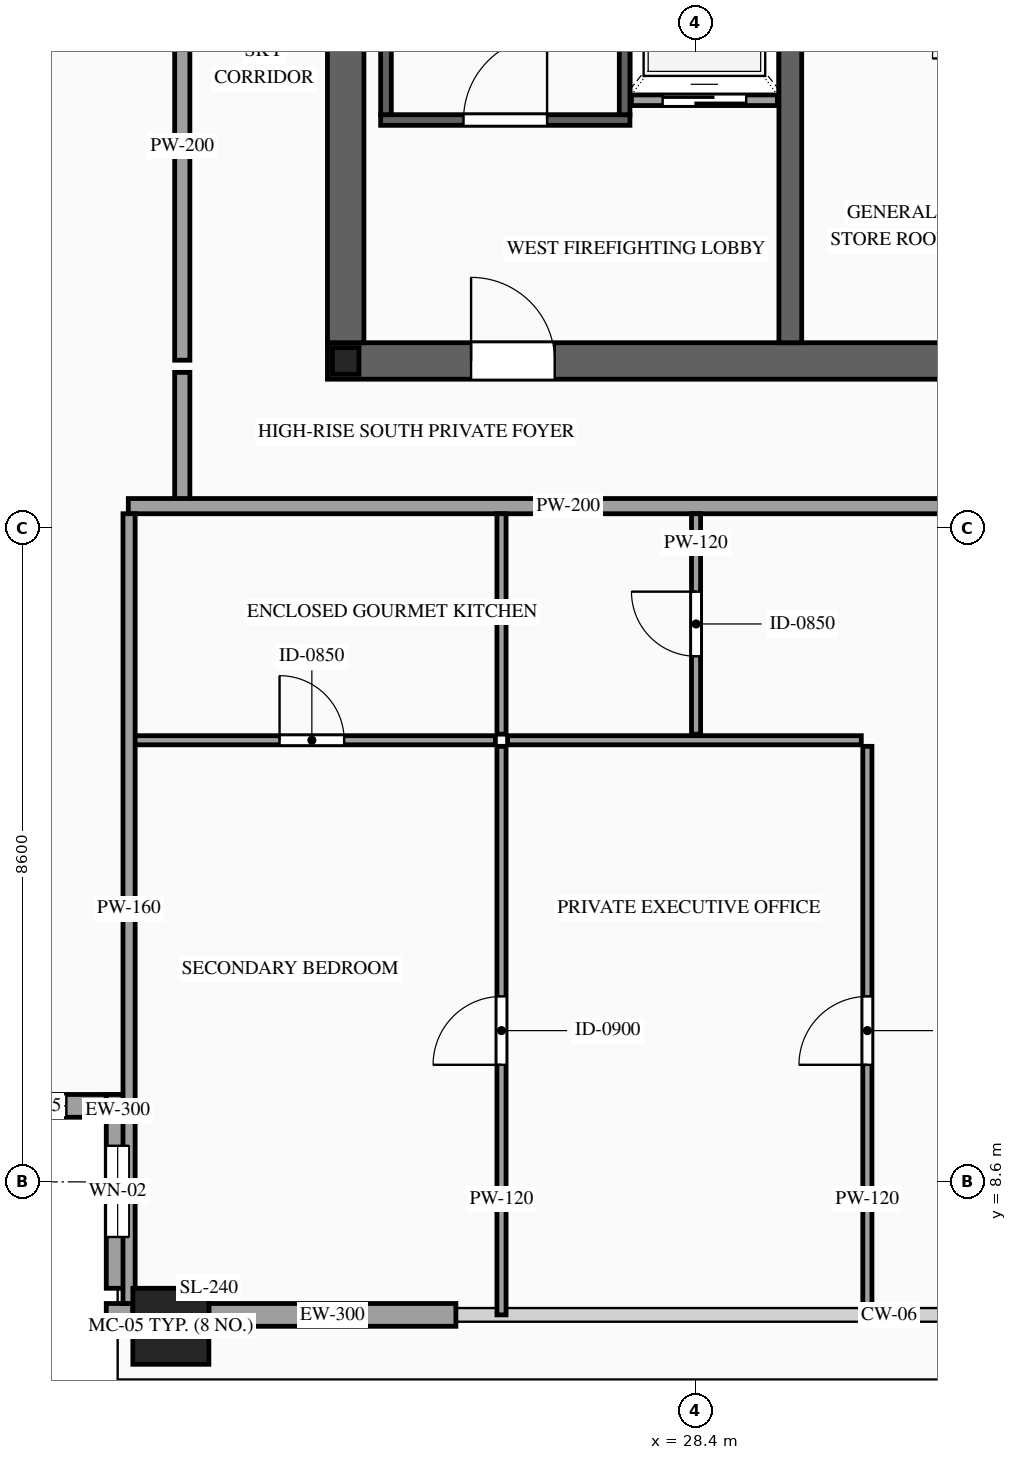
"""IFC4 building model, lengths in metres.
Left out: names, types, materials, properties, quantities, classifications, styles, units other than length and angle.
Written with IfcOpenShell. Run it as: python <this file> out.ifc"""

import sys

from ifc_helpers import new_model, si_unit, direction, frame, frame_2d, origin, origin_2d, place, context, subcontext, project, spatial, rectangle, hollow_rectangle, i_section, extrude, source, transform, mapped, element, fill, save


model = new_model("IFC4")
c1 = context("Model", 3, precision=1e-05, world=origin(), true_north=direction((0.0, 1.0)))
c2 = subcontext(c1, "Body", "Model", "MODEL_VIEW")
j1 = project(units=[si_unit("LENGTHUNIT", "METRE"), si_unit("PLANEANGLEUNIT", "RADIAN")], contexts=[c1])
p1 = place(None, origin())
s1 = spatial("IfcSite", under=j1, at=p1, CompositionType="ELEMENT")
p2 = place(p1, origin())
s2 = spatial("IfcBuilding", under=s1, at=p2, CompositionType="ELEMENT")
p3 = place(p2, frame((0.0, 0.0, 347.2)))
s3 = spatial("IfcBuildingStorey", under=s2, at=p3, CompositionType="ELEMENT", Elevation=347.2)
p4 = place(p3, frame((23.56, 19.4, 0.0), z_axis=(0.0, 0.0, 1.0), x_axis=(1.0, 0.0, 0.0)))
e1 = element("IfcWall", 1, at=p4, inside=s3, PredefinedType="SHEAR", context=c2, shape_type="SweptSolid", body=[
    extrude(rectangle(XDim=26.88, YDim=0.48, at=frame_2d((13.44, 0.0))), origin(), (0.0, 0.0, 1.0), 4.0),
])
p5 = place(p4, frame((1.89, 0.0, 0.0)))
e2 = element("IfcOpeningElement", 2, at=p5, cuts=e1, PredefinedType="OPENING", context=c2, shape_type="SweptSolid", body=[
    extrude(rectangle(XDim=1.1, YDim=2.2, at=frame_2d((0.55, 1.1))), frame((0.0, 0.255, 0.0), z_axis=(0.0, -1.0, 0.0), x_axis=(1.0, 0.0, 0.0)), (0.0, 0.0, 1.0), 0.51),
])
p6 = place(p4, frame((9.79, 0.0, 0.0)))
e3 = element("IfcOpeningElement", 3, at=p6, cuts=e1, PredefinedType="OPENING", context=c2, shape_type="SweptSolid", body=[
    extrude(rectangle(XDim=1.1, YDim=2.2, at=frame_2d((0.55, 1.1))), frame((0.0, 0.255, 0.0), z_axis=(0.0, -1.0, 0.0), x_axis=(1.0, 0.0, 0.0)), (0.0, 0.0, 1.0), 0.51),
])
p7 = place(p4, frame((22.99, 0.0, 0.0)))
e4 = element("IfcOpeningElement", 4, at=p7, cuts=e1, PredefinedType="OPENING", context=c2, shape_type="SweptSolid", body=[
    extrude(rectangle(XDim=1.1, YDim=2.2, at=frame_2d((0.55, 1.1))), frame((0.0, 0.255, 0.0), z_axis=(0.0, -1.0, 0.0), x_axis=(1.0, 0.0, 0.0)), (0.0, 0.0, 1.0), 0.51),
])
p8 = place(p4, frame((19.61, 0.0, 0.0)))
e5 = element("IfcOpeningElement", 5, at=p8, cuts=e1, PredefinedType="OPENING", context=c2, shape_type="SweptSolid", body=[
    extrude(rectangle(XDim=0.9, YDim=2.15, at=frame_2d((0.45, 1.075))), frame((0.0, 0.255, 0.0), z_axis=(0.0, -1.0, 0.0), x_axis=(1.0, 0.0, 0.0)), (0.0, 0.0, 1.0), 0.51),
])
p9 = place(p4, frame((18.17, 0.0, 0.0)))
e6 = element("IfcOpeningElement", 6, at=p9, cuts=e1, PredefinedType="OPENING", context=c2, shape_type="SweptSolid", body=[
    extrude(rectangle(XDim=0.9, YDim=2.15, at=frame_2d((0.45, 1.075))), frame((0.0, 0.255, 0.0), z_axis=(0.0, -1.0, 0.0), x_axis=(1.0, 0.0, 0.0)), (0.0, 0.0, 1.0), 0.51),
])
m1 = source(origin(), c2, "Body", "SweptSolid", [
    extrude(rectangle(XDim=12.32, YDim=0.48, at=frame_2d((6.16, 0.0))), origin(), (0.0, 0.0, 1.0), 4.0),
])
p10 = place(p3, frame((23.8, 19.64, 0.0), z_axis=(0.0, 0.0, 1.0), x_axis=(0.0, 1.0, 0.0)))
e7 = element("IfcWall", 7, at=p10, inside=s3, PredefinedType="SHEAR", context=c2, shape_type="MappedRepresentation", body=[
    mapped(m1, transform((0.0, 0.0, 0.0), scale=1.0)),
])
m2 = source(origin(), c2, "Body", "SweptSolid", [
    extrude(rectangle(XDim=12.32, YDim=0.3, at=frame_2d((6.16, 0.0))), origin(), (0.0, 0.0, 1.0), 4.0),
])
p11 = place(p3, frame((29.65, 19.64, 0.0), z_axis=(0.0, 0.0, 1.0), x_axis=(0.0, 1.0, 0.0)))
e8 = element("IfcWall", 8, at=p11, inside=s3, PredefinedType="SOLIDWALL", context=c2, shape_type="MappedRepresentation", body=[
    mapped(m2, transform((0.0, 0.0, 0.0), scale=1.0)),
])
m3 = source(origin(), c2, "Body", "SweptSolid", [
    extrude(i_section(OverallWidth=0.35, OverallDepth=0.35, WebThickness=0.012, FlangeThickness=0.019, at=origin_2d()), origin(), (0.0, 0.0, 1.0), 4.0),
])
p12 = place(p3, frame((23.8, 19.4, 0.0), z_axis=(0.0, 0.0, 1.0), x_axis=(1.0, 0.0, 0.0)))
e9 = element("IfcColumn", 9, at=p12, inside=s3, PredefinedType="COLUMN", context=c2, shape_type="MappedRepresentation", body=[
    mapped(m3, transform((0.0, 0.0, 0.0), scale=1.0)),
])
m4 = source(origin(), c2, "Body", "SweptSolid", [
    extrude(hollow_rectangle(XDim=1.0, YDim=1.0, WallThickness=0.048, at=origin_2d()), origin(), (0.0, 0.0, 1.0), 4.0),
])
p13 = place(p3, frame((21.5, 6.7, 0.0), z_axis=(0.0, 0.0, 1.0), x_axis=(1.0, 0.0, 0.0)))
e10 = element("IfcColumn", 10, at=p13, inside=s3, PredefinedType="COLUMN", context=c2, shape_type="MappedRepresentation", body=[
    mapped(m4, transform((0.0, 0.0, 0.0), scale=1.0)),
])
p14 = place(p3, frame((18.4, 9.6, 0.0), z_axis=(0.0, 0.0, 1.0), x_axis=(1.0, 0.0, 0.0)))
e11 = element("IfcWall", 11, at=p14, inside=s3, PredefinedType="SOLIDWALL", context=c2, shape_type="SweptSolid", body=[
    extrude(rectangle(XDim=2.55, YDim=0.3, at=frame_2d((1.275, 0.0))), origin(), (0.0, 0.0, 1.0), 3.7),
])
p15 = place(p14, frame((0.825, 0.0, 0.85)))
e12 = element("IfcOpeningElement", 12, at=p15, cuts=e11, PredefinedType="OPENING", context=c2, shape_type="SweptSolid", body=[
    extrude(rectangle(XDim=0.9, YDim=1.5, at=frame_2d((0.45, 0.75))), frame((0.0, 0.165, 0.0), z_axis=(0.0, -1.0, 0.0), x_axis=(1.0, 0.0, 0.0)), (0.0, 0.0, 1.0), 0.33),
])
p16 = place(p3, frame((20.8, 9.75, 0.0), z_axis=(0.0, 0.0, 1.0), x_axis=(0.0, -1.0, 0.0)))
e13 = element("IfcWall", 13, at=p16, inside=s3, PredefinedType="SOLIDWALL", context=c2, shape_type="SweptSolid", body=[
    extrude(rectangle(XDim=2.55, YDim=0.3, at=frame_2d((1.275, 0.0))), origin(), (0.0, 0.0, 1.0), 3.7),
])
p17 = place(p16, frame((0.675, 0.0, 0.85)))
e14 = element("IfcOpeningElement", 14, at=p17, cuts=e13, PredefinedType="OPENING", context=c2, shape_type="SweptSolid", body=[
    extrude(rectangle(XDim=1.2, YDim=2.1, at=frame_2d((0.6, 1.05))), frame((0.0, 0.165, 0.0), z_axis=(0.0, -1.0, 0.0), x_axis=(1.0, 0.0, 0.0)), (0.0, 0.0, 1.0), 0.33),
])
m5 = source(origin(), c2, "Body", "SweptSolid", [
    extrude(rectangle(XDim=0.35, YDim=0.3, at=frame_2d((0.175, 0.0))), origin(), (0.0, 0.0, 1.0), 3.7),
])
p18 = place(p3, frame((20.65, 6.85, 0.0), z_axis=(0.0, 0.0, 1.0), x_axis=(1.0, 0.0, 0.0)))
e15 = element("IfcWall", 15, at=p18, inside=s3, PredefinedType="SOLIDWALL", context=c2, shape_type="MappedRepresentation", body=[
    mapped(m5, transform((0.0, 0.0, 0.0), scale=1.0)),
])
m6 = source(origin(), c2, "Body", "SweptSolid", [
    extrude(rectangle(XDim=3.25, YDim=0.3, at=frame_2d((1.625, 0.0))), origin(), (0.0, 0.0, 1.0), 3.305),
])
p19 = place(p3, frame((22.0, 6.85, 0.0), z_axis=(0.0, 0.0, 1.0), x_axis=(1.0, 0.0, 0.0)))
e16 = element("IfcWall", 16, at=p19, inside=s3, PredefinedType="SOLIDWALL", context=c2, shape_type="MappedRepresentation", body=[
    mapped(m6, transform((0.0, 0.0, 0.0), scale=1.0)),
])
p20 = place(p3, frame((27.56, 22.83, 0.0), z_axis=(0.0, 0.0, 1.0), x_axis=(1.0, 0.0, 0.0)))
e17 = element("IfcWall", 17, at=p20, inside=s3, PredefinedType="SOLIDWALL", context=c2, shape_type="SweptSolid", body=[
    extrude(rectangle(XDim=1.92, YDim=0.14, at=frame_2d((0.96, 0.0))), origin(), (0.0, 0.0, 1.0), 3.7),
])
p21 = place(p20, frame((0.41, 0.0, 0.0)))
e18 = element("IfcOpeningElement", 18, at=p21, cuts=e17, PredefinedType="OPENING", context=c2, shape_type="SweptSolid", body=[
    extrude(rectangle(XDim=1.1, YDim=2.2, at=frame_2d((0.55, 1.1))), frame((0.0, 0.085, 0.0), z_axis=(0.0, -1.0, 0.0), x_axis=(1.0, 0.0, 0.0)), (0.0, 0.0, 1.0), 0.17),
])
p22 = place(p3, frame((24.26, 22.57, 0.0), z_axis=(0.0, 0.0, 1.0), x_axis=(1.0, 0.0, 0.0)))
e19 = element("IfcWall", 19, at=p22, inside=s3, PredefinedType="SOLIDWALL", context=c2, shape_type="SweptSolid", body=[
    extrude(rectangle(XDim=3.28, YDim=0.14, at=frame_2d((1.64, 0.0))), origin(), (0.0, 0.0, 1.0), 3.7),
])
p23 = place(p22, frame((1.09, 0.0, 0.0)))
e20 = element("IfcOpeningElement", 20, at=p23, cuts=e19, PredefinedType="OPENING", context=c2, shape_type="SweptSolid", body=[
    extrude(rectangle(XDim=1.1, YDim=2.2, at=frame_2d((0.55, 1.1))), frame((0.0, 0.085, 0.0), z_axis=(0.0, -1.0, 0.0), x_axis=(1.0, 0.0, 0.0)), (0.0, 0.0, 1.0), 0.17),
])
m7 = source(origin(), c2, "Body", "SweptSolid", [
    extrude(rectangle(XDim=8.94, YDim=0.14, at=frame_2d((4.47, 0.0))), origin(), (0.0, 0.0, 1.0), 3.7),
])
for number, where, z_axis, x_axis in (
    (21, (24.33, 22.64, 0.0), (0.0, 0.0, 1.0), (0.0, 1.0, 0.0)),
    (22, (27.47, 22.64, 0.0), (0.0, 0.0, 1.0), (0.0, 1.0, 0.0)),
):
    element("IfcWall", number, at=place(p3, frame(where, z_axis=z_axis, x_axis=x_axis)), inside=s3, PredefinedType="SOLIDWALL", context=c2, shape_type="MappedRepresentation", body=[
        mapped(m7, transform((0.0, 0.0, 0.0), scale=1.0)),
    ])
m8 = source(origin(), c2, "Body", "SweptSolid", [
    extrude(rectangle(XDim=1.7, YDim=0.2, at=frame_2d((0.85, 0.0))), origin(), (0.0, 0.0, 1.0), 3.7),
])
p24 = place(p3, frame((21.65, 17.55, 0.0), z_axis=(0.0, 0.0, 1.0), x_axis=(0.0, 1.0, 0.0)))
e23 = element("IfcWall", 23, at=p24, inside=s3, PredefinedType="PARTITIONING", context=c2, shape_type="MappedRepresentation", body=[
    mapped(m8, transform((0.0, 0.0, 0.0), scale=1.0)),
])
p25 = place(p3, frame((20.94, 17.49, 0.0), z_axis=(0.0, 0.0, 1.0), x_axis=(1.0, 0.0, 0.0)))
e24 = element("IfcWall", 24, at=p25, inside=s3, PredefinedType="PARTITIONING", context=c2, shape_type="SweptSolid", body=[
    extrude(rectangle(XDim=19.834, YDim=0.2, at=frame_2d((9.917, 0.0))), origin(), (0.0, 0.0, 1.0), 3.7),
])
p26 = place(p25, frame((11.824, 0.0, 0.0)))
e25 = element("IfcOpeningElement", 25, at=p26, cuts=e24, PredefinedType="OPENING", context=c2, shape_type="SweptSolid", body=[
    extrude(rectangle(XDim=1.0, YDim=2.2, at=frame_2d((0.5, 1.1))), frame((0.0, 0.115, 0.0), z_axis=(0.0, -1.0, 0.0), x_axis=(1.0, 0.0, 0.0)), (0.0, 0.0, 1.0), 0.23),
])
p27 = place(p3, frame((20.94, 14.41, 0.0), z_axis=(0.0, 0.0, 1.0), x_axis=(1.0, 0.0, 0.0)))
e26 = element("IfcWall", 26, at=p27, inside=s3, PredefinedType="PARTITIONING", context=c2, shape_type="SweptSolid", body=[
    extrude(rectangle(XDim=4.83, YDim=0.12, at=frame_2d((2.415, 0.0))), origin(), (0.0, 0.0, 1.0), 3.7),
])
p28 = place(p27, frame((1.99, 0.0, 0.0)))
e27 = element("IfcOpeningElement", 27, at=p28, cuts=e26, PredefinedType="OPENING", context=c2, shape_type="SweptSolid", body=[
    extrude(rectangle(XDim=0.85, YDim=2.1, at=frame_2d((0.425, 1.05))), frame((0.0, 0.075, 0.0), z_axis=(0.0, -1.0, 0.0), x_axis=(1.0, 0.0, 0.0)), (0.0, 0.0, 1.0), 0.15),
])
m9 = source(origin(), c2, "Body", "SweptSolid", [
    extrude(rectangle(XDim=2.9, YDim=0.12, at=frame_2d((1.45, 0.0))), origin(), (0.0, 0.0, 1.0), 3.7),
])
p29 = place(p3, frame((25.85, 14.49, 0.0), z_axis=(0.0, 0.0, 1.0), x_axis=(0.0, 1.0, 0.0)))
e28 = element("IfcWall", 28, at=p29, inside=s3, PredefinedType="PARTITIONING", context=c2, shape_type="MappedRepresentation", body=[
    mapped(m9, transform((0.0, 0.0, 0.0), scale=1.0)),
])
p30 = place(p3, frame((28.41, 14.49, 0.0), z_axis=(0.0, 0.0, 1.0), x_axis=(0.0, 1.0, 0.0)))
e29 = element("IfcWall", 29, at=p30, inside=s3, PredefinedType="PARTITIONING", context=c2, shape_type="SweptSolid", body=[
    extrude(rectangle(XDim=2.9, YDim=0.12, at=frame_2d((1.45, 0.0))), origin(), (0.0, 0.0, 1.0), 3.7),
])
p31 = place(p30, frame((1.025, 0.0, 0.0)))
e30 = element("IfcOpeningElement", 30, at=p31, cuts=e29, PredefinedType="OPENING", context=c2, shape_type="SweptSolid", body=[
    extrude(rectangle(XDim=0.85, YDim=2.1, at=frame_2d((0.425, 1.05))), frame((0.0, 0.075, 0.0), z_axis=(0.0, -1.0, 0.0), x_axis=(1.0, 0.0, 0.0)), (0.0, 0.0, 1.0), 0.15),
])
p32 = place(p3, frame((25.85, 6.85, 0.0), z_axis=(0.0, 0.0, 1.0), x_axis=(0.0, 1.0, 0.0)))
e31 = element("IfcWall", 31, at=p32, inside=s3, PredefinedType="PARTITIONING", context=c2, shape_type="SweptSolid", body=[
    extrude(rectangle(XDim=7.48, YDim=0.12, at=frame_2d((3.74, 0.0))), origin(), (0.0, 0.0, 1.0), 3.7),
])
p33 = place(p32, frame((3.29, 0.0, 0.0)))
e32 = element("IfcOpeningElement", 32, at=p33, cuts=e31, PredefinedType="OPENING", context=c2, shape_type="SweptSolid", body=[
    extrude(rectangle(XDim=0.9, YDim=2.15, at=frame_2d((0.45, 1.075))), frame((0.0, 0.075, 0.0), z_axis=(0.0, -1.0, 0.0), x_axis=(1.0, 0.0, 0.0)), (0.0, 0.0, 1.0), 0.15),
])
m10 = source(origin(), c2, "Body", "SweptSolid", [
    extrude(rectangle(XDim=4.654, YDim=0.12, at=frame_2d((2.327, 0.0))), origin(), (0.0, 0.0, 1.0), 3.7),
])
p34 = place(p3, frame((25.93, 14.41, 0.0), z_axis=(0.0, 0.0, 1.0), x_axis=(1.0, 0.0, 0.0)))
e33 = element("IfcWall", 33, at=p34, inside=s3, PredefinedType="PARTITIONING", context=c2, shape_type="MappedRepresentation", body=[
    mapped(m10, transform((0.0, 0.0, 0.0), scale=1.0)),
])
p35 = place(p3, frame((30.664, 6.85, 0.0), z_axis=(0.0, 0.0, 1.0), x_axis=(0.0, 1.0, 0.0)))
e34 = element("IfcWall", 34, at=p35, inside=s3, PredefinedType="PARTITIONING", context=c2, shape_type="SweptSolid", body=[
    extrude(rectangle(XDim=7.48, YDim=0.12, at=frame_2d((3.74, 0.0))), origin(), (0.0, 0.0, 1.0), 3.7),
])
p36 = place(p35, frame((3.29, 0.0, 0.0)))
e35 = element("IfcOpeningElement", 35, at=p36, cuts=e34, PredefinedType="OPENING", context=c2, shape_type="SweptSolid", body=[
    extrude(rectangle(XDim=0.9, YDim=2.15, at=frame_2d((0.45, 1.075))), frame((0.0, 0.075, 0.0), z_axis=(0.0, -1.0, 0.0), x_axis=(1.0, 0.0, 0.0)), (0.0, 0.0, 1.0), 0.15),
])
m11 = source(origin(), c2, "Body", "SweptSolid", [
    extrude(rectangle(XDim=10.39, YDim=0.16, at=frame_2d((5.195, 0.0))), origin(), (0.0, 0.0, 1.0), 3.7),
])
p37 = place(p3, frame((20.95, 7.0, 0.0), z_axis=(0.0, 0.0, 1.0), x_axis=(0.0, 1.0, 0.0)))
e36 = element("IfcWall", 36, at=p37, inside=s3, PredefinedType="PARTITIONING", context=c2, shape_type="MappedRepresentation", body=[
    mapped(m11, transform((0.0, 0.0, 0.0), scale=1.0)),
])
p38 = place(p3, frame((21.65, 19.41, 0.0), z_axis=(0.0, 0.0, 1.0), x_axis=(0.0, 1.0, 0.0)))
e37 = element("IfcWall", 37, at=p38, inside=s3, PredefinedType="PARTITIONING", context=c2, shape_type="SweptSolid", body=[
    extrude(rectangle(XDim=12.78, YDim=0.2, at=frame_2d((6.39, 0.0))), origin(), (0.0, 0.0, 1.0), 3.7),
])
p39 = place(p38, frame((5.89, 0.0, 0.0)))
e38 = element("IfcOpeningElement", 38, at=p39, cuts=e37, PredefinedType="OPENING", context=c2, shape_type="SweptSolid", body=[
    extrude(rectangle(XDim=1.0, YDim=2.2, at=frame_2d((0.5, 1.1))), frame((0.0, 0.115, 0.0), z_axis=(0.0, -1.0, 0.0), x_axis=(1.0, 0.0, 0.0)), (0.0, 0.0, 1.0), 0.23),
])
m12 = source(origin(), c2, "Body", "SweptSolid", [
    extrude(rectangle(XDim=0.9, YDim=1.5, at=frame_2d((0.45, 0.75))), frame((0.0, 0.03, 0.0), z_axis=(0.0, -1.0, 0.0), x_axis=(1.0, 0.0, 0.0)), (0.0, 0.0, 1.0), 0.06),
])
p40 = place(p15, origin())
e39 = element("IfcWindow", 39, at=p40, inside=s3, PartitioningType="SINGLE_PANEL", PredefinedType="WINDOW", context=c2, shape_type="MappedRepresentation", body=[
    mapped(m12, transform((0.0, 0.0, 0.0), scale=1.0)),
])
fill(e12, e39)
m13 = source(origin(), c2, "Body", "SweptSolid", [
    extrude(rectangle(XDim=1.2, YDim=2.1, at=frame_2d((0.6, 1.05))), frame((0.0, 0.03, 0.0), z_axis=(0.0, -1.0, 0.0), x_axis=(1.0, 0.0, 0.0)), (0.0, 0.0, 1.0), 0.06),
])
p41 = place(p17, origin())
e40 = element("IfcWindow", 40, at=p41, inside=s3, PartitioningType="SINGLE_PANEL", PredefinedType="WINDOW", context=c2, shape_type="MappedRepresentation", body=[
    mapped(m13, transform((0.0, 0.0, 0.0), scale=1.0)),
])
fill(e14, e40)
m14 = source(origin(), c2, "Body", "SweptSolid", [
    extrude(rectangle(XDim=1.1, YDim=2.2, at=frame_2d((0.55, 1.1))), frame((0.0, 0.025, 0.0), z_axis=(0.0, -1.0, 0.0), x_axis=(1.0, 0.0, 0.0)), (0.0, 0.0, 1.0), 0.05),
])
p42 = place(p21, origin())
e41 = element("IfcDoor", 41, at=p42, inside=s3, OperationType="SLIDING_TO_LEFT", PredefinedType="DOOR", context=c2, shape_type="MappedRepresentation", body=[
    mapped(m14, transform((0.0, 0.0, 0.0), scale=1.0)),
])
fill(e18, e41)
m15 = source(origin(), c2, "Body", "SweptSolid", [
    extrude(rectangle(XDim=1.1, YDim=2.2, at=frame_2d((0.55, 1.1))), frame((0.0, 0.025, 0.0), z_axis=(0.0, -1.0, 0.0), x_axis=(1.0, 0.0, 0.0)), (0.0, 0.0, 1.0), 0.05),
])
p43 = place(p23, origin())
e42 = element("IfcDoor", 42, at=p43, inside=s3, OperationType="SINGLE_SWING_RIGHT", PredefinedType="DOOR", context=c2, shape_type="MappedRepresentation", body=[
    mapped(m15, transform((0.0, 0.0, 0.0), scale=1.0)),
])
fill(e20, e42)
p44 = place(p5, origin())
e43 = element("IfcDoor", 43, at=p44, inside=s3, OperationType="SINGLE_SWING_LEFT", PredefinedType="DOOR", context=c2, shape_type="MappedRepresentation", body=[
    mapped(m15, transform((0.0, 0.0, 0.0), scale=1.0)),
])
fill(e2, e43)
m16 = source(origin(), c2, "Body", "SweptSolid", [
    extrude(rectangle(XDim=0.85, YDim=2.1, at=frame_2d((0.425, 1.05))), frame((0.0, 0.025, 0.0), z_axis=(0.0, -1.0, 0.0), x_axis=(1.0, 0.0, 0.0)), (0.0, 0.0, 1.0), 0.05),
])
p45 = place(p28, origin())
e44 = element("IfcDoor", 44, at=p45, inside=s3, OperationType="SINGLE_SWING_LEFT", PredefinedType="DOOR", context=c2, shape_type="MappedRepresentation", body=[
    mapped(m16, transform((0.0, 0.0, 0.0), scale=1.0)),
])
fill(e27, e44)
p46 = place(p31, origin())
e45 = element("IfcDoor", 45, at=p46, inside=s3, OperationType="SINGLE_SWING_RIGHT", PredefinedType="DOOR", context=c2, shape_type="MappedRepresentation", body=[
    mapped(m16, transform((0.0, 0.0, 0.0), scale=1.0)),
])
fill(e30, e45)
m17 = source(origin(), c2, "Body", "SweptSolid", [
    extrude(rectangle(XDim=0.9, YDim=2.15, at=frame_2d((0.45, 1.075))), frame((0.0, 0.025, 0.0), z_axis=(0.0, -1.0, 0.0), x_axis=(1.0, 0.0, 0.0)), (0.0, 0.0, 1.0), 0.05),
])
p47 = place(p33, origin())
e46 = element("IfcDoor", 46, at=p47, inside=s3, OperationType="SINGLE_SWING_LEFT", PredefinedType="DOOR", context=c2, shape_type="MappedRepresentation", body=[
    mapped(m17, transform((0.0, 0.0, 0.0), scale=1.0)),
])
fill(e32, e46)
p48 = place(p36, origin())
e47 = element("IfcDoor", 47, at=p48, inside=s3, OperationType="SINGLE_SWING_LEFT", PredefinedType="DOOR", context=c2, shape_type="MappedRepresentation", body=[
    mapped(m17, transform((0.0, 0.0, 0.0), scale=1.0)),
])
fill(e35, e47)
save(model, sys.argv[1])
